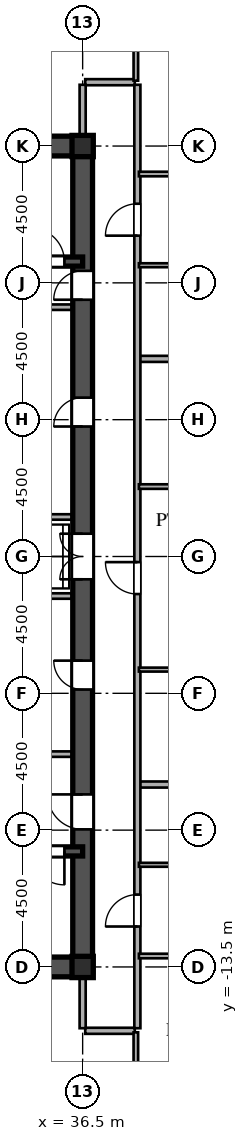
"""IFC4 building model, lengths in metres.
Left out: names, types, materials, properties, quantities, classifications, styles, units other than length and angle.
Written with IfcOpenShell. Run it as: python <this file> out.ifc"""

import sys

from ifc_helpers import new_model, si_unit, direction, frame, frame_2d, origin, origin_2d, place, context, subcontext, project, spatial, rectangle, i_section, extrude, source, transform, mapped, element, fill, save


model = new_model("IFC4")
c1 = context("Model", 3, precision=1e-05, world=origin(), true_north=direction((0.0, 1.0)))
c2 = subcontext(c1, "Body", "Model", "MODEL_VIEW")
j1 = project(units=[si_unit("LENGTHUNIT", "METRE"), si_unit("PLANEANGLEUNIT", "RADIAN")], contexts=[c1])
p1 = place(None, origin())
s1 = spatial("IfcSite", under=j1, at=p1, CompositionType="ELEMENT")
p2 = place(p1, origin())
s2 = spatial("IfcBuilding", under=s1, at=p2, CompositionType="ELEMENT")
p3 = place(p2, frame((0.0, 0.0, 110.4)))
s3 = spatial("IfcBuildingStorey", under=s2, at=p3, CompositionType="ELEMENT", Elevation=110.4)
m1 = source(origin(), c2, "Body", "SweptSolid", [
    extrude(i_section(OverallWidth=0.7, OverallDepth=0.7, WebThickness=0.028, FlangeThickness=0.045, at=origin_2d()), origin(), (0.0, 0.0, 1.0), 3.6),
])
for number, where, z_axis, x_axis in (
    (1, (36.5, -13.5, 0.0), (0.0, 0.0, 1.0), (1.0, 0.0, 0.0)),
    (2, (36.5, 13.5, 0.0), (0.0, 0.0, 1.0), (1.0, 0.0, 0.0)),
):
    element("IfcColumn", number, at=place(p3, frame(where, z_axis=z_axis, x_axis=x_axis)), inside=s3, PredefinedType="COLUMN", context=c2, shape_type="MappedRepresentation", body=[
        mapped(m1, transform((0.0, 0.0, 0.0), scale=1.0)),
    ])
for number, where, z_axis, x_axis in (
    (3, (27.5, -13.5, 0.0), (0.0, 0.0, 1.0), (1.0, 0.0, 0.0)),
    (4, (27.5, 13.5, 0.0), (0.0, 0.0, 1.0), (1.0, 0.0, 0.0)),
):
    element("IfcWall", number, at=place(p3, frame(where, z_axis=z_axis, x_axis=x_axis)), inside=s3, PredefinedType="SHEAR", context=c2, shape_type="SweptSolid", body=[
        extrude(rectangle(XDim=9.0, YDim=0.65, at=frame_2d((4.5, 0.0))), origin(), (0.0, 0.0, 1.0), 3.38),
    ])
p4 = place(p3, frame((36.5, -13.65, 0.0), z_axis=(0.0, 0.0, 1.0), x_axis=(0.0, 1.0, 0.0)))
e5 = element("IfcWall", 5, at=p4, inside=s3, PredefinedType="SHEAR", context=c2, shape_type="SweptSolid", body=[
    extrude(rectangle(XDim=7.15, YDim=0.65, at=frame_2d((3.575, 0.0))), origin(), (0.0, 0.0, 1.0), 3.38),
])
p5 = place(p4, frame((4.675, 0.0, 0.0)))
e6 = element("IfcOpeningElement", 6, at=p5, cuts=e5, PredefinedType="OPENING", context=c2, shape_type="SweptSolid", body=[
    extrude(rectangle(XDim=1.15, YDim=2.2, at=frame_2d((0.575, 1.1))), frame((0.0, 0.335, 0.0), z_axis=(0.0, -1.0, 0.0), x_axis=(1.0, 0.0, 0.0)), (0.0, 0.0, 1.0), 0.67),
])
p6 = place(p3, frame((36.5, -1.3, 0.0), z_axis=(0.0, 0.0, 1.0), x_axis=(0.0, 1.0, 0.0)))
e7 = element("IfcWall", 7, at=p6, inside=s3, PredefinedType="SHEAR", context=c2, shape_type="SweptSolid", body=[
    extrude(rectangle(XDim=2.6, YDim=0.65, at=frame_2d((1.3, 0.0))), origin(), (0.0, 0.0, 1.0), 3.38),
])
p7 = place(p6, frame((0.55, 0.0, 0.0)))
e8 = element("IfcOpeningElement", 8, at=p7, cuts=e7, PredefinedType="OPENING", context=c2, shape_type="SweptSolid", body=[
    extrude(rectangle(XDim=1.5, YDim=2.3, at=frame_2d((0.75, 1.15))), frame((0.0, 0.335, 0.0), z_axis=(0.0, -1.0, 0.0), x_axis=(1.0, 0.0, 0.0)), (0.0, 0.0, 1.0), 0.67),
])
p8 = place(p3, frame((36.5, 8.2, 0.0), z_axis=(0.0, 0.0, 1.0), x_axis=(0.0, 1.0, 0.0)))
e9 = element("IfcWall", 9, at=p8, inside=s3, PredefinedType="SHEAR", context=c2, shape_type="SweptSolid", body=[
    extrude(rectangle(XDim=5.45, YDim=0.65, at=frame_2d((2.725, 0.0))), origin(), (0.0, 0.0, 1.0), 3.38),
])
p9 = place(p8, frame((0.245, 0.0, 0.0)))
e10 = element("IfcOpeningElement", 10, at=p9, cuts=e9, PredefinedType="OPENING", context=c2, shape_type="SweptSolid", body=[
    extrude(rectangle(XDim=0.95, YDim=2.15, at=frame_2d((0.475, 1.075))), frame((0.0, 0.335, 0.0), z_axis=(0.0, -1.0, 0.0), x_axis=(1.0, 0.0, 0.0)), (0.0, 0.0, 1.0), 0.67),
])
p10 = place(p3, frame((36.5, -6.5, 0.0), z_axis=(0.0, 0.0, 1.0), x_axis=(0.0, 1.0, 0.0)))
e11 = element("IfcWall", 11, at=p10, inside=s3, PredefinedType="SHEAR", context=c2, shape_type="SweptSolid", body=[
    extrude(rectangle(XDim=5.2, YDim=0.65, at=frame_2d((2.6, 0.0))), origin(), (0.0, 0.0, 1.0), 3.38),
])
p11 = place(p10, frame((2.125, 0.0, 0.0)))
e12 = element("IfcOpeningElement", 12, at=p11, cuts=e11, PredefinedType="OPENING", context=c2, shape_type="SweptSolid", body=[
    extrude(rectangle(XDim=0.95, YDim=2.15, at=frame_2d((0.475, 1.075))), frame((0.0, 0.335, 0.0), z_axis=(0.0, -1.0, 0.0), x_axis=(1.0, 0.0, 0.0)), (0.0, 0.0, 1.0), 0.67),
])
p12 = place(p3, frame((36.5, 1.3, 0.0), z_axis=(0.0, 0.0, 1.0), x_axis=(0.0, 1.0, 0.0)))
e13 = element("IfcWall", 13, at=p12, inside=s3, PredefinedType="SHEAR", context=c2, shape_type="SweptSolid", body=[
    extrude(rectangle(XDim=6.9, YDim=0.65, at=frame_2d((3.45, 0.0))), origin(), (0.0, 0.0, 1.0), 3.38),
])
p13 = place(p12, frame((2.975, 0.0, 0.0)))
e14 = element("IfcOpeningElement", 14, at=p13, cuts=e13, PredefinedType="OPENING", context=c2, shape_type="SweptSolid", body=[
    extrude(rectangle(XDim=0.95, YDim=2.15, at=frame_2d((0.475, 1.075))), frame((0.0, 0.335, 0.0), z_axis=(0.0, -1.0, 0.0), x_axis=(1.0, 0.0, 0.0)), (0.0, 0.0, 1.0), 0.67),
])
p14 = place(p3, frame((27.5, -9.7, 0.0), z_axis=(0.0, 0.0, 1.0), x_axis=(1.0, 0.0, 0.0)))
e15 = element("IfcWall", 15, at=p14, inside=s3, PredefinedType="SHEAR", context=c2, shape_type="SweptSolid", body=[
    extrude(rectangle(XDim=9.0, YDim=0.3, at=frame_2d((4.5, 0.0))), origin(), (0.0, 0.0, 1.0), 3.38),
])
p15 = place(p14, frame((7.3, 0.0, 0.0)))
e16 = element("IfcOpeningElement", 16, at=p15, cuts=e15, PredefinedType="OPENING", context=c2, shape_type="SweptSolid", body=[
    extrude(rectangle(XDim=1.1, YDim=2.2, at=frame_2d((0.55, 1.1))), frame((0.0, 0.16, 0.0), z_axis=(0.0, -1.0, 0.0), x_axis=(1.0, 0.0, 0.0)), (0.0, 0.0, 1.0), 0.32),
])
p16 = place(p3, frame((27.5, 9.7, 0.0), z_axis=(0.0, 0.0, 1.0), x_axis=(1.0, 0.0, 0.0)))
e17 = element("IfcWall", 17, at=p16, inside=s3, PredefinedType="SHEAR", context=c2, shape_type="SweptSolid", body=[
    extrude(rectangle(XDim=9.0, YDim=0.3, at=frame_2d((4.5, 0.0))), origin(), (0.0, 0.0, 1.0), 3.38),
])
p17 = place(p16, frame((7.3, 0.0, 0.0)))
e18 = element("IfcOpeningElement", 18, at=p17, cuts=e17, PredefinedType="OPENING", context=c2, shape_type="SweptSolid", body=[
    extrude(rectangle(XDim=1.1, YDim=2.2, at=frame_2d((0.55, 1.1))), frame((0.0, 0.16, 0.0), z_axis=(0.0, -1.0, 0.0), x_axis=(1.0, 0.0, 0.0)), (0.0, 0.0, 1.0), 0.32),
])
for number, where, z_axis, x_axis in (
    (19, (30.45, -6.5, 0.0), (0.0, 0.0, 1.0), (1.0, 0.0, 0.0)),
    (20, (30.45, 8.2, 0.0), (0.0, 0.0, 1.0), (1.0, 0.0, 0.0)),
):
    element("IfcWall", number, at=place(p3, frame(where, z_axis=z_axis, x_axis=x_axis)), inside=s3, PredefinedType="PARTITIONING", context=c2, shape_type="SweptSolid", body=[
        extrude(rectangle(XDim=5.7, YDim=0.18, at=frame_2d((2.85, 0.0))), origin(), (0.0, 0.0, 1.0), 3.38),
    ])
for number, where, z_axis, x_axis in (
    (21, (33.2, -1.3, 0.0), (0.0, 0.0, 1.0), (1.0, 0.0, 0.0)),
    (22, (33.2, 1.3, 0.0), (0.0, 0.0, 1.0), (1.0, 0.0, 0.0)),
):
    element("IfcWall", number, at=place(p3, frame(where, z_axis=z_axis, x_axis=x_axis)), inside=s3, PredefinedType="PARTITIONING", context=c2, shape_type="SweptSolid", body=[
        extrude(rectangle(XDim=2.95, YDim=0.18, at=frame_2d((1.475, 0.0))), origin(), (0.0, 0.0, 1.0), 3.38),
    ])
p18 = place(p3, frame((36.585, -15.6, 0.0), z_axis=(0.0, 0.0, 1.0), x_axis=(1.0, 0.0, 0.0)))
e23 = element("IfcWall", 23, at=p18, inside=s3, PredefinedType="PARTITIONING", context=c2, shape_type="SweptSolid", body=[
    extrude(rectangle(XDim=1.63, YDim=0.2, at=frame_2d((0.815, 0.0))), origin(), (0.0, 0.0, 1.0), 3.38),
])
p19 = place(p3, frame((38.35, -13.14, 0.0), z_axis=(0.0, 0.0, 1.0), x_axis=(1.0, 0.0, 0.0)))
e24 = element("IfcWall", 24, at=p19, inside=s3, PredefinedType="PARTITIONING", context=c2, shape_type="SweptSolid", body=[
    extrude(rectangle(XDim=5.7, YDim=0.15, at=frame_2d((2.85, 0.0))), origin(), (0.0, 0.0, 1.0), 3.38),
])
p20 = place(p19, frame((2.375, 0.0, 0.0)))
e25 = element("IfcOpeningElement", 25, at=p20, cuts=e24, PredefinedType="OPENING", context=c2, shape_type="SweptSolid", body=[
    extrude(rectangle(XDim=0.95, YDim=2.15, at=frame_2d((0.475, 1.075))), frame((0.0, 0.085, 0.0), z_axis=(0.0, -1.0, 0.0), x_axis=(1.0, 0.0, 0.0)), (0.0, 0.0, 1.0), 0.17),
])
p21 = place(p3, frame((38.35, -10.14, 0.0), z_axis=(0.0, 0.0, 1.0), x_axis=(1.0, 0.0, 0.0)))
e26 = element("IfcWall", 26, at=p21, inside=s3, PredefinedType="PARTITIONING", context=c2, shape_type="SweptSolid", body=[
    extrude(rectangle(XDim=5.7, YDim=0.13, at=frame_2d((2.85, 0.0))), origin(), (0.0, 0.0, 1.0), 3.38),
])
p22 = place(p21, frame((2.41, 0.0, 0.0)))
e27 = element("IfcOpeningElement", 27, at=p22, cuts=e26, PredefinedType="OPENING", context=c2, shape_type="SweptSolid", body=[
    extrude(rectangle(XDim=0.88, YDim=2.1, at=frame_2d((0.44, 1.05))), frame((0.0, 0.075, 0.0), z_axis=(0.0, -1.0, 0.0), x_axis=(1.0, 0.0, 0.0)), (0.0, 0.0, 1.0), 0.15),
])
p23 = place(p3, frame((38.38, -7.5, 0.0), z_axis=(0.0, 0.0, 1.0), x_axis=(1.0, 0.0, 0.0)))
e28 = element("IfcWall", 28, at=p23, inside=s3, PredefinedType="PARTITIONING", context=c2, shape_type="SweptSolid", body=[
    extrude(rectangle(XDim=26.259, YDim=0.2, at=frame_2d((13.129, 0.0))), origin(), (0.0, 0.0, 1.0), 3.38),
])
p24 = place(p3, frame((38.35, -3.72, 0.0), z_axis=(0.0, 0.0, 1.0), x_axis=(1.0, 0.0, 0.0)))
e29 = element("IfcWall", 29, at=p24, inside=s3, PredefinedType="PARTITIONING", context=c2, shape_type="SweptSolid", body=[
    extrude(rectangle(XDim=5.7, YDim=0.13, at=frame_2d((2.85, 0.0))), origin(), (0.0, 0.0, 1.0), 3.38),
])
p25 = place(p24, frame((2.41, 0.0, 0.0)))
e30 = element("IfcOpeningElement", 30, at=p25, cuts=e29, PredefinedType="OPENING", context=c2, shape_type="SweptSolid", body=[
    extrude(rectangle(XDim=0.88, YDim=2.1, at=frame_2d((0.44, 1.05))), frame((0.0, 0.075, 0.0), z_axis=(0.0, -1.0, 0.0), x_axis=(1.0, 0.0, 0.0)), (0.0, 0.0, 1.0), 0.15),
])
p26 = place(p3, frame((38.35, 2.3, 0.0), z_axis=(0.0, 0.0, 1.0), x_axis=(1.0, 0.0, 0.0)))
e31 = element("IfcWall", 31, at=p26, inside=s3, PredefinedType="PARTITIONING", context=c2, shape_type="SweptSolid", body=[
    extrude(rectangle(XDim=5.7, YDim=0.15, at=frame_2d((2.85, 0.0))), origin(), (0.0, 0.0, 1.0), 3.38),
])
p27 = place(p26, frame((2.375, 0.0, 0.0)))
e32 = element("IfcOpeningElement", 32, at=p27, cuts=e31, PredefinedType="OPENING", context=c2, shape_type="SweptSolid", body=[
    extrude(rectangle(XDim=0.95, YDim=2.15, at=frame_2d((0.475, 1.075))), frame((0.0, 0.085, 0.0), z_axis=(0.0, -1.0, 0.0), x_axis=(1.0, 0.0, 0.0)), (0.0, 0.0, 1.0), 0.17),
])
p28 = place(p3, frame((38.38, 6.5, 0.0), z_axis=(0.0, 0.0, 1.0), x_axis=(1.0, 0.0, 0.0)))
e33 = element("IfcWall", 33, at=p28, inside=s3, PredefinedType="PARTITIONING", context=c2, shape_type="SweptSolid", body=[
    extrude(rectangle(XDim=28.208, YDim=0.2, at=frame_2d((14.104, 0.0))), origin(), (0.0, 0.0, 1.0), 3.38),
])
p29 = place(p3, frame((38.35, 9.58, 0.0), z_axis=(0.0, 0.0, 1.0), x_axis=(1.0, 0.0, 0.0)))
e34 = element("IfcWall", 34, at=p29, inside=s3, PredefinedType="PARTITIONING", context=c2, shape_type="SweptSolid", body=[
    extrude(rectangle(XDim=5.7, YDim=0.13, at=frame_2d((2.85, 0.0))), origin(), (0.0, 0.0, 1.0), 3.38),
])
p30 = place(p29, frame((2.41, 0.0, 0.0)))
e35 = element("IfcOpeningElement", 35, at=p30, cuts=e34, PredefinedType="OPENING", context=c2, shape_type="SweptSolid", body=[
    extrude(rectangle(XDim=0.88, YDim=2.1, at=frame_2d((0.44, 1.05))), frame((0.0, 0.075, 0.0), z_axis=(0.0, -1.0, 0.0), x_axis=(1.0, 0.0, 0.0)), (0.0, 0.0, 1.0), 0.15),
])
p31 = place(p3, frame((38.35, 12.58, 0.0), z_axis=(0.0, 0.0, 1.0), x_axis=(1.0, 0.0, 0.0)))
e36 = element("IfcWall", 36, at=p31, inside=s3, PredefinedType="PARTITIONING", context=c2, shape_type="SweptSolid", body=[
    extrude(rectangle(XDim=5.7, YDim=0.15, at=frame_2d((2.85, 0.0))), origin(), (0.0, 0.0, 1.0), 3.38),
])
p32 = place(p31, frame((2.375, 0.0, 0.0)))
e37 = element("IfcOpeningElement", 37, at=p32, cuts=e36, PredefinedType="OPENING", context=c2, shape_type="SweptSolid", body=[
    extrude(rectangle(XDim=0.95, YDim=2.15, at=frame_2d((0.475, 1.075))), frame((0.0, 0.085, 0.0), z_axis=(0.0, -1.0, 0.0), x_axis=(1.0, 0.0, 0.0)), (0.0, 0.0, 1.0), 0.17),
])
p33 = place(p3, frame((36.585, 15.6, 0.0), z_axis=(0.0, 0.0, 1.0), x_axis=(1.0, 0.0, 0.0)))
e38 = element("IfcWall", 38, at=p33, inside=s3, PredefinedType="PARTITIONING", context=c2, shape_type="SweptSolid", body=[
    extrude(rectangle(XDim=1.63, YDim=0.2, at=frame_2d((0.815, 0.0))), origin(), (0.0, 0.0, 1.0), 3.38),
])
for number, where, z_axis, x_axis in (
    (39, (36.5, -15.515, 0.0), (0.0, 0.0, 1.0), (0.0, 1.0, 0.0)),
    (40, (36.5, 13.83, 0.0), (0.0, 0.0, 1.0), (0.0, 1.0, 0.0)),
):
    element("IfcWall", number, at=place(p3, frame(where, z_axis=z_axis, x_axis=x_axis)), inside=s3, PredefinedType="PARTITIONING", context=c2, shape_type="SweptSolid", body=[
        extrude(rectangle(XDim=1.685, YDim=0.2, at=frame_2d((0.842, 0.0))), origin(), (0.0, 0.0, 1.0), 2.78),
    ])
p34 = place(p3, frame((38.25, -21.071, 0.0), z_axis=(0.0, 0.0, 1.0), x_axis=(0.0, 1.0, 0.0)))
e41 = element("IfcWall", 41, at=p34, inside=s3, PredefinedType="PARTITIONING", context=c2, shape_type="SweptSolid", body=[
    extrude(rectangle(XDim=5.421, YDim=0.15, at=frame_2d((2.71, 0.0))), origin(), (0.0, 0.0, 1.0), 3.38),
])
p35 = place(p34, frame((0.578, 0.0, 0.0)))
e42 = element("IfcOpeningElement", 42, at=p35, cuts=e41, PredefinedType="OPENING", context=c2, shape_type="SweptSolid", body=[
    extrude(rectangle(XDim=0.95, YDim=2.15, at=frame_2d((0.475, 1.075))), frame((0.0, 0.085, 0.0), z_axis=(0.0, -1.0, 0.0), x_axis=(1.0, 0.0, 0.0)), (0.0, 0.0, 1.0), 0.17),
])
p36 = place(p3, frame((38.25, 15.65, 0.0), z_axis=(0.0, 0.0, 1.0), x_axis=(0.0, 1.0, 0.0)))
e43 = element("IfcWall", 43, at=p36, inside=s3, PredefinedType="PARTITIONING", context=c2, shape_type="SweptSolid", body=[
    extrude(rectangle(XDim=5.421, YDim=0.15, at=frame_2d((2.71, 0.0))), origin(), (0.0, 0.0, 1.0), 3.38),
])
p37 = place(p36, frame((1.175, 0.0, 0.0)))
e44 = element("IfcOpeningElement", 44, at=p37, cuts=e43, PredefinedType="OPENING", context=c2, shape_type="SweptSolid", body=[
    extrude(rectangle(XDim=0.95, YDim=2.15, at=frame_2d((0.475, 1.075))), frame((0.0, 0.085, 0.0), z_axis=(0.0, -1.0, 0.0), x_axis=(1.0, 0.0, 0.0)), (0.0, 0.0, 1.0), 0.17),
])
p38 = place(p3, frame((38.3, -15.515, 0.0), z_axis=(0.0, 0.0, 1.0), x_axis=(0.0, 1.0, 0.0)))
e45 = element("IfcWall", 45, at=p38, inside=s3, PredefinedType="PARTITIONING", context=c2, shape_type="SweptSolid", body=[
    extrude(rectangle(XDim=31.03, YDim=0.2, at=frame_2d((15.515, 0.0))), origin(), (0.0, 0.0, 1.0), 3.38),
])
p39 = place(p38, frame((3.345, 0.0, 0.0)))
e46 = element("IfcOpeningElement", 46, at=p39, cuts=e45, PredefinedType="OPENING", context=c2, shape_type="SweptSolid", body=[
    extrude(rectangle(XDim=1.05, YDim=2.25, at=frame_2d((0.525, 1.125))), frame((0.0, 0.11, 0.0), z_axis=(0.0, -1.0, 0.0), x_axis=(1.0, 0.0, 0.0)), (0.0, 0.0, 1.0), 0.22),
])
p40 = place(p38, frame((14.28, 0.0, 0.0)))
e47 = element("IfcOpeningElement", 47, at=p40, cuts=e45, PredefinedType="OPENING", context=c2, shape_type="SweptSolid", body=[
    extrude(rectangle(XDim=1.05, YDim=2.25, at=frame_2d((0.525, 1.125))), frame((0.0, 0.11, 0.0), z_axis=(0.0, -1.0, 0.0), x_axis=(1.0, 0.0, 0.0)), (0.0, 0.0, 1.0), 0.22),
])
p41 = place(p38, frame((26.067, 0.0, 0.0)))
e48 = element("IfcOpeningElement", 48, at=p41, cuts=e45, PredefinedType="OPENING", context=c2, shape_type="SweptSolid", body=[
    extrude(rectangle(XDim=1.05, YDim=2.25, at=frame_2d((0.525, 1.125))), frame((0.0, 0.11, 0.0), z_axis=(0.0, -1.0, 0.0), x_axis=(1.0, 0.0, 0.0)), (0.0, 0.0, 1.0), 0.22),
])
m2 = source(origin(), c2, "Body", "SweptSolid", [
    extrude(rectangle(XDim=1.15, YDim=2.2, at=frame_2d((0.575, 1.1))), frame((0.0, 0.025, 0.0), z_axis=(0.0, -1.0, 0.0), x_axis=(1.0, 0.0, 0.0)), (0.0, 0.0, 1.0), 0.05),
])
p42 = place(p5, origin())
e49 = element("IfcDoor", 49, at=p42, inside=s3, OperationType="SINGLE_SWING_RIGHT", PredefinedType="DOOR", context=c2, shape_type="MappedRepresentation", body=[
    mapped(m2, transform((0.0, 0.0, 0.0), scale=1.0)),
])
fill(e6, e49)
m3 = source(origin(), c2, "Body", "SweptSolid", [
    extrude(rectangle(XDim=1.5, YDim=2.3, at=frame_2d((0.75, 1.15))), frame((0.0, 0.025, 0.0), z_axis=(0.0, -1.0, 0.0), x_axis=(1.0, 0.0, 0.0)), (0.0, 0.0, 1.0), 0.05),
])
p43 = place(p7, origin())
e50 = element("IfcDoor", 50, at=p43, inside=s3, OperationType="DOUBLE_SWING_LEFT", PredefinedType="DOOR", context=c2, shape_type="MappedRepresentation", body=[
    mapped(m3, transform((0.0, 0.0, 0.0), scale=1.0)),
])
fill(e8, e50)
m4 = source(origin(), c2, "Body", "SweptSolid", [
    extrude(rectangle(XDim=0.95, YDim=2.15, at=frame_2d((0.475, 1.075))), frame((0.0, 0.025, 0.0), z_axis=(0.0, -1.0, 0.0), x_axis=(1.0, 0.0, 0.0)), (0.0, 0.0, 1.0), 0.05),
])
p44 = place(p9, origin())
e51 = element("IfcDoor", 51, at=p44, inside=s3, OperationType="SINGLE_SWING_LEFT", PredefinedType="DOOR", context=c2, shape_type="MappedRepresentation", body=[
    mapped(m4, transform((0.0, 0.0, 0.0), scale=1.0)),
])
fill(e10, e51)
p45 = place(p11, origin())
e52 = element("IfcDoor", 52, at=p45, inside=s3, OperationType="SINGLE_SWING_RIGHT", PredefinedType="DOOR", context=c2, shape_type="MappedRepresentation", body=[
    mapped(m4, transform((0.0, 0.0, 0.0), scale=1.0)),
])
fill(e12, e52)
p46 = place(p13, origin())
e53 = element("IfcDoor", 53, at=p46, inside=s3, OperationType="SINGLE_SWING_LEFT", PredefinedType="DOOR", context=c2, shape_type="MappedRepresentation", body=[
    mapped(m4, transform((0.0, 0.0, 0.0), scale=1.0)),
])
fill(e14, e53)
m5 = source(origin(), c2, "Body", "SweptSolid", [
    extrude(rectangle(XDim=1.1, YDim=2.2, at=frame_2d((0.55, 1.1))), frame((0.0, 0.025, 0.0), z_axis=(0.0, -1.0, 0.0), x_axis=(1.0, 0.0, 0.0)), (0.0, 0.0, 1.0), 0.05),
])
p47 = place(p15, frame((1.1, 0.0, 0.0), z_axis=(0.0, 0.0, 1.0), x_axis=(-1.0, 0.0, 0.0)))
e54 = element("IfcDoor", 54, at=p47, inside=s3, OperationType="SINGLE_SWING_RIGHT", PredefinedType="DOOR", context=c2, shape_type="MappedRepresentation", body=[
    mapped(m5, transform((0.0, 0.0, 0.0), scale=1.0)),
])
fill(e16, e54)
p48 = place(p17, origin())
e55 = element("IfcDoor", 55, at=p48, inside=s3, OperationType="SINGLE_SWING_LEFT", PredefinedType="DOOR", context=c2, shape_type="MappedRepresentation", body=[
    mapped(m5, transform((0.0, 0.0, 0.0), scale=1.0)),
])
fill(e18, e55)
m6 = source(origin(), c2, "Body", "SweptSolid", [
    extrude(rectangle(XDim=1.05, YDim=2.25, at=frame_2d((0.525, 1.125))), frame((0.0, 0.025, 0.0), z_axis=(0.0, -1.0, 0.0), x_axis=(1.0, 0.0, 0.0)), (0.0, 0.0, 1.0), 0.05),
])
p49 = place(p39, origin())
e56 = element("IfcDoor", 56, at=p49, inside=s3, OperationType="SINGLE_SWING_LEFT", PredefinedType="DOOR", context=c2, shape_type="MappedRepresentation", body=[
    mapped(m6, transform((0.0, 0.0, 0.0), scale=1.0)),
])
fill(e46, e56)
p50 = place(p40, origin())
e57 = element("IfcDoor", 57, at=p50, inside=s3, OperationType="SINGLE_SWING_RIGHT", PredefinedType="DOOR", context=c2, shape_type="MappedRepresentation", body=[
    mapped(m6, transform((0.0, 0.0, 0.0), scale=1.0)),
])
fill(e47, e57)
p51 = place(p41, origin())
e58 = element("IfcDoor", 58, at=p51, inside=s3, OperationType="SINGLE_SWING_LEFT", PredefinedType="DOOR", context=c2, shape_type="MappedRepresentation", body=[
    mapped(m6, transform((0.0, 0.0, 0.0), scale=1.0)),
])
fill(e48, e58)
save(model, sys.argv[1])
